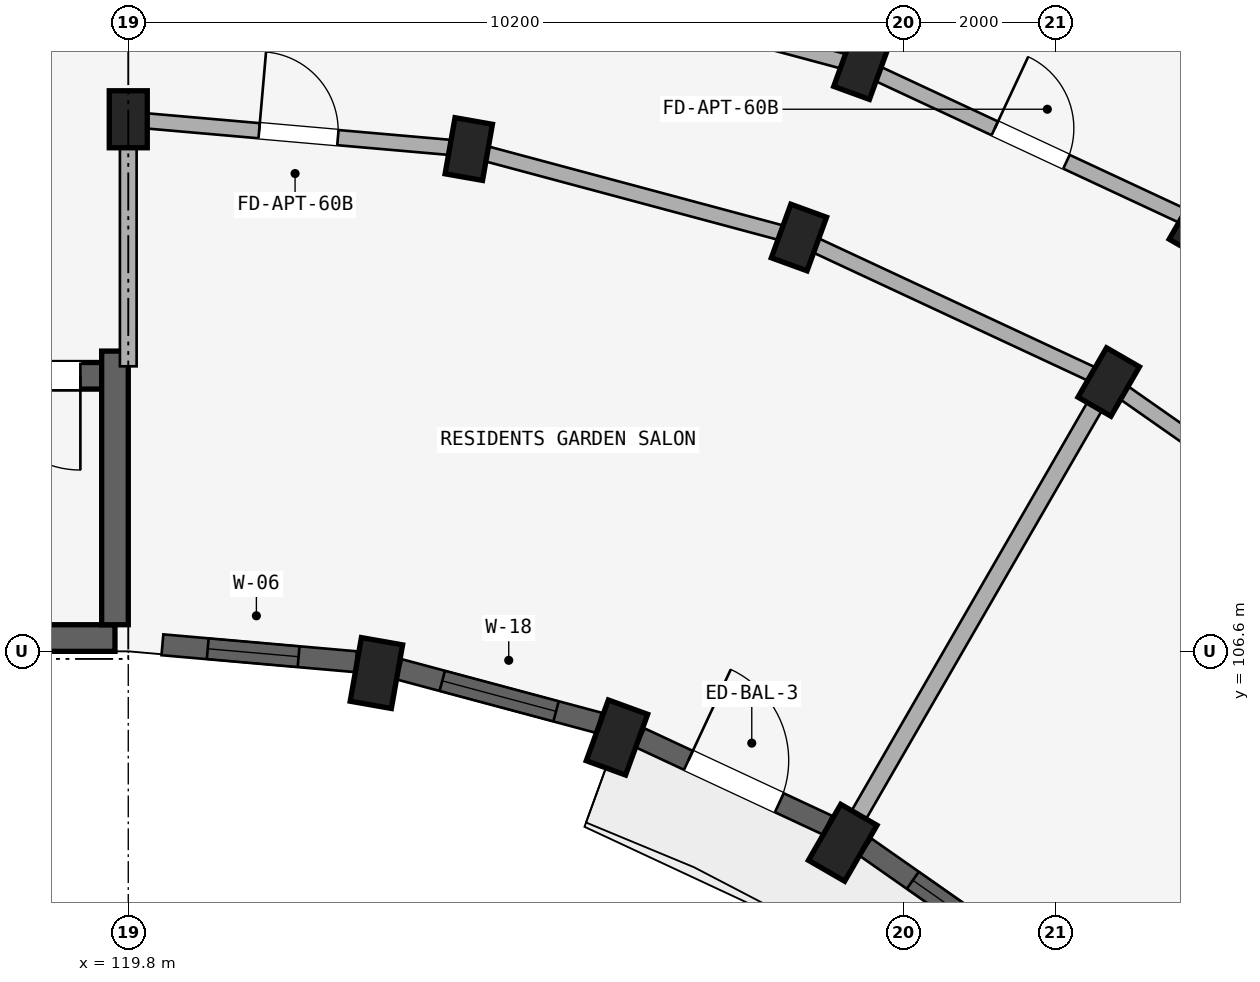
"""IFC4 building model, lengths in metres.
Left out: names, types, materials, properties, quantities, classifications, styles, units other than length and angle.
Written with IfcOpenShell. Run it as: python <this file> out.ifc"""

import sys

from ifc_helpers import new_model, si_unit, direction, frame, frame_2d, origin, origin_2d, place, context, subcontext, project, spatial, rectangle, extrude, element, fill, save


model = new_model("IFC4")
c1 = context("Model", 3, precision=1e-05, world=origin(), true_north=direction((0.0, 1.0)))
c2 = subcontext(c1, "Body", "Model", "MODEL_VIEW")
j1 = project(units=[si_unit("LENGTHUNIT", "METRE"), si_unit("PLANEANGLEUNIT", "RADIAN")], contexts=[c1])
p1 = place(None, origin())
s1 = spatial("IfcSite", under=j1, at=p1, CompositionType="ELEMENT")
p2 = place(p1, origin())
s2 = spatial("IfcBuilding", under=s1, at=p2, CompositionType="ELEMENT")
p3 = place(p2, frame((0.0, 0.0, 8.7)))
s3 = spatial("IfcBuildingStorey", under=s2, at=p3, CompositionType="ELEMENT", Elevation=8.7)
p4 = place(p3, frame((119.625, 106.775, 0.0), z_axis=(0.0, 0.0, 1.0), x_axis=(-1.0, 0.0, 0.0)))
e1 = element("IfcWall", 1, at=p4, inside=s3, PredefinedType="SHEAR", context=c2, shape_type="SweptSolid", body=[
    extrude(rectangle(XDim=8.25, YDim=0.35, at=frame_2d((4.125, 0.0))), origin(), (0.0, 0.0, 1.0), 2.93),
])
p5 = place(p3, frame((119.45, 110.225, 0.0), z_axis=(0.0, 0.0, 1.0), x_axis=(-1.0, 0.0, 0.0)))
e2 = element("IfcWall", 2, at=p5, inside=s3, PredefinedType="SHEAR", context=c2, shape_type="SweptSolid", body=[
    extrude(rectangle(XDim=7.9, YDim=0.35, at=frame_2d((3.95, 0.0))), origin(), (0.0, 0.0, 1.0), 2.93),
])
p6 = place(p5, frame((0.28, 0.0, 0.0)))
e3 = element("IfcOpeningElement", 3, at=p6, cuts=e2, PredefinedType="OPENING", context=c2, shape_type="SweptSolid", body=[
    extrude(rectangle(XDim=1.24, YDim=2.15, at=frame_2d((0.62, 1.075))), frame((0.0, 0.185, 0.0), z_axis=(0.0, -1.0, 0.0), x_axis=(1.0, 0.0, 0.0)), (0.0, 0.0, 1.0), 0.37),
])
p7 = place(p3, frame((119.625, 106.95, 0.0), z_axis=(0.0, 0.0, 1.0), x_axis=(0.0, 1.0, 0.0)))
e4 = element("IfcWall", 4, at=p7, inside=s3, PredefinedType="SHEAR", context=c2, shape_type="SweptSolid", body=[
    extrude(rectangle(XDim=3.6, YDim=0.35, at=frame_2d((1.8, 0.0))), origin(), (0.0, 0.0, 1.0), 2.93),
])
p8 = place(p3, frame((119.8, 113.6, 0.0), z_axis=(0.0, 0.0, 1.0), x_axis=(1.0, 0.0, 0.0)))
e5 = element("IfcColumn", 5, at=p8, inside=s3, PredefinedType="COLUMN", context=c2, shape_type="SweptSolid", body=[
    extrude(rectangle(XDim=0.5, YDim=0.75, at=origin_2d()), origin(), (0.0, 0.0, 1.0), 2.93),
])
p9 = place(p3, frame((123.065, 106.314, 0.0), z_axis=(0.0, 0.0, 1.0), x_axis=(-0.984807753012, 0.173648177667, 0.0)))
e6 = element("IfcColumn", 6, at=p9, inside=s3, PredefinedType="COLUMN", context=c2, shape_type="SweptSolid", body=[
    extrude(rectangle(XDim=0.55, YDim=0.85, at=origin_2d()), origin(), (0.0, 0.0, 1.0), 2.93),
])
p10 = place(p3, frame((124.28, 113.208, 0.0), z_axis=(0.0, 0.0, 1.0), x_axis=(-0.984807753012, 0.173648177667, 0.0)))
e7 = element("IfcColumn", 7, at=p10, inside=s3, PredefinedType="COLUMN", context=c2, shape_type="SweptSolid", body=[
    extrude(rectangle(XDim=0.5, YDim=0.75, at=origin_2d()), origin(), (0.0, 0.0, 1.0), 2.93),
])
p11 = place(p3, frame((126.23, 105.466, 0.0), z_axis=(0.0, 0.0, 1.0), x_axis=(-0.939692620786, 0.342020143326, 0.0)))
e8 = element("IfcColumn", 8, at=p11, inside=s3, PredefinedType="COLUMN", context=c2, shape_type="SweptSolid", body=[
    extrude(rectangle(XDim=0.55, YDim=0.85, at=origin_2d()), origin(), (0.0, 0.0, 1.0), 2.93),
])
for number, where, z_axis, x_axis in (
    (9, (128.624, 112.044, 0.0), (0.0, 0.0, 1.0), (-0.94, 0.342, 0.0)),
    (10, (129.445, 114.299, 0.0), (0.0, 0.0, 1.0), (-0.94, 0.342, 0.0)),
):
    element("IfcColumn", number, at=place(p3, frame(where, z_axis=z_axis, x_axis=x_axis)), inside=s3, PredefinedType="COLUMN", context=c2, shape_type="SweptSolid", body=[
        extrude(rectangle(XDim=0.5, YDim=0.75, at=origin_2d()), origin(), (0.0, 0.0, 1.0), 2.93),
    ])
p12 = place(p3, frame((129.2, 104.081, 0.0), z_axis=(0.0, 0.0, 1.0), x_axis=(-0.866025403784, 0.5, 0.0)))
e11 = element("IfcColumn", 11, at=p12, inside=s3, PredefinedType="COLUMN", context=c2, shape_type="SweptSolid", body=[
    extrude(rectangle(XDim=0.55, YDim=0.85, at=origin_2d()), origin(), (0.0, 0.0, 1.0), 2.93),
])
for number, where, z_axis, x_axis in (
    (12, (132.7, 110.144, 0.0), (0.0, 0.0, 1.0), (-0.866, 0.5, 0.0)),
    (13, (133.9, 112.222, 0.0), (0.0, 0.0, 1.0), (-0.866, 0.5, 0.0)),
):
    element("IfcColumn", number, at=place(p3, frame(where, z_axis=z_axis, x_axis=x_axis)), inside=s3, PredefinedType="COLUMN", context=c2, shape_type="SweptSolid", body=[
        extrude(rectangle(XDim=0.5, YDim=0.75, at=origin_2d()), origin(), (0.0, 0.0, 1.0), 2.93),
    ])
p13 = place(p3, frame((119.8, 113.6, 0.0), z_axis=(0.0, 0.0, 1.0), x_axis=(0.996191949488, -0.087187153726, 0.0)))
e14 = element("IfcWall", 14, at=p13, inside=s3, PredefinedType="STANDARD", context=c2, shape_type="SweptSolid", body=[
    extrude(rectangle(XDim=4.497, YDim=0.2, at=frame_2d((2.249, 0.0))), origin(), (0.0, 0.0, 1.0), 2.372),
])
p14 = place(p13, frame((1.729, 0.0, 0.0)))
e15 = element("IfcOpeningElement", 15, at=p14, cuts=e14, PredefinedType="OPENING", context=c2, shape_type="SweptSolid", body=[
    extrude(rectangle(XDim=1.04, YDim=2.15, at=frame_2d((0.52, 1.075))), frame((0.0, 0.11, 0.0), z_axis=(0.0, -1.0, 0.0), x_axis=(1.0, 0.0, 0.0)), (0.0, 0.0, 1.0), 0.22),
])
p15 = place(p3, frame((124.28, 113.208, 0.0), z_axis=(0.0, 0.0, 1.0), x_axis=(0.965934240054, -0.258787642463, 0.0)))
e16 = element("IfcWall", 16, at=p15, inside=s3, PredefinedType="STANDARD", context=c2, shape_type="SweptSolid", body=[
    extrude(rectangle(XDim=4.497, YDim=0.2, at=frame_2d((2.249, 0.0))), origin(), (0.0, 0.0, 1.0), 2.372),
])
p16 = place(p3, frame((124.697, 115.572, 0.0), z_axis=(0.0, 0.0, 1.0), x_axis=(0.965930095386, -0.258803112091, 0.0)))
e17 = element("IfcWall", 17, at=p16, inside=s3, PredefinedType="STANDARD", context=c2, shape_type="SweptSolid", body=[
    extrude(rectangle(XDim=4.916, YDim=0.2, at=frame_2d((2.458, 0.0))), origin(), (0.0, 0.0, 1.0), 2.372),
])
p17 = place(p3, frame((128.624, 112.044, 0.0), z_axis=(0.0, 0.0, 1.0), x_axis=(0.906307919131, -0.422617978463, 0.0)))
e18 = element("IfcWall", 18, at=p17, inside=s3, PredefinedType="STANDARD", context=c2, shape_type="SweptSolid", body=[
    extrude(rectangle(XDim=4.497, YDim=0.2, at=frame_2d((2.249, 0.0))), origin(), (0.0, 0.0, 1.0), 2.372),
])
p18 = place(p3, frame((129.445, 114.299, 0.0), z_axis=(0.0, 0.0, 1.0), x_axis=(0.906302381024, -0.422629854778, 0.0)))
e19 = element("IfcWall", 19, at=p18, inside=s3, PredefinedType="STANDARD", context=c2, shape_type="SweptSolid", body=[
    extrude(rectangle(XDim=4.915, YDim=0.2, at=frame_2d((2.458, 0.0))), origin(), (0.0, 0.0, 1.0), 2.372),
])
p19 = place(p18, frame((1.938, 0.0, 0.0)))
e20 = element("IfcOpeningElement", 20, at=p19, cuts=e19, PredefinedType="OPENING", context=c2, shape_type="SweptSolid", body=[
    extrude(rectangle(XDim=1.04, YDim=2.15, at=frame_2d((0.52, 1.075))), frame((0.0, 0.11, 0.0), z_axis=(0.0, -1.0, 0.0), x_axis=(1.0, 0.0, 0.0)), (0.0, 0.0, 1.0), 0.22),
])
p20 = place(p3, frame((132.7, 110.144, 0.0), z_axis=(0.0, 0.0, 1.0), x_axis=(0.819155404658, -0.573571637217, 0.0)))
e21 = element("IfcWall", 21, at=p20, inside=s3, PredefinedType="STANDARD", context=c2, shape_type="SweptSolid", body=[
    extrude(rectangle(XDim=4.497, YDim=0.2, at=frame_2d((2.249, 0.0))), origin(), (0.0, 0.0, 1.0), 2.372),
])
p21 = place(p20, frame((1.709, 0.0, 0.0)))
e22 = element("IfcOpeningElement", 22, at=p21, cuts=e21, PredefinedType="OPENING", context=c2, shape_type="SweptSolid", body=[
    extrude(rectangle(XDim=1.08, YDim=2.15, at=frame_2d((0.54, 1.075))), frame((0.0, 0.11, 0.0), z_axis=(0.0, -1.0, 0.0), x_axis=(1.0, 0.0, 0.0)), (0.0, 0.0, 1.0), 0.22),
])
p22 = place(p3, frame((119.8, 110.35, 0.0), z_axis=(0.0, 0.0, 1.0), x_axis=(0.0, 1.0, 0.0)))
e23 = element("IfcWall", 23, at=p22, inside=s3, PredefinedType="STANDARD", context=c2, shape_type="SweptSolid", body=[
    extrude(rectangle(XDim=3.2, YDim=0.22, at=frame_2d((1.6, 0.0))), origin(), (0.0, 0.0, 1.0), 2.372),
])
p23 = place(p3, frame((129.479, 114.393, 0.0), z_axis=(0.0, 0.0, 1.0), x_axis=(0.342022120477, 0.939691901159, 0.0)))
e24 = element("IfcWall", 24, at=p23, inside=s3, PredefinedType="STANDARD", context=c2, shape_type="SweptSolid", body=[
    extrude(rectangle(XDim=17.42, YDim=0.23, at=frame_2d((8.71, 0.0))), origin(), (0.0, 0.0, 1.0), 2.372),
])
p24 = place(p3, frame((129.3, 104.254, 0.0), z_axis=(0.0, 0.0, 1.0), x_axis=(0.499997969693, 0.866026575979, 0.0)))
e25 = element("IfcWall", 25, at=p24, inside=s3, PredefinedType="STANDARD", context=c2, shape_type="SweptSolid", body=[
    extrude(rectangle(XDim=6.75, YDim=0.22, at=frame_2d((3.375, 0.0))), origin(), (0.0, 0.0, 1.0), 2.372),
])
p25 = place(p3, frame((120.249, 106.686, 0.0), z_axis=(0.0, 0.0, 1.0), x_axis=(0.996194235595, -0.08716102895, 0.0)))
e26 = element("IfcWall", 26, at=p25, inside=s3, PredefinedType="STANDARD", context=c2, shape_type="SweptSolid", body=[
    extrude(rectangle(XDim=2.557, YDim=0.275, at=frame_2d((1.279, 0.0))), origin(), (0.0, 0.0, 1.0), 2.472),
])
p26 = place(p25, frame((0.599, 0.0, 0.772)))
e27 = element("IfcOpeningElement", 27, at=p26, cuts=e26, PredefinedType="OPENING", context=c2, shape_type="SweptSolid", body=[
    extrude(rectangle(XDim=1.2, YDim=1.5, at=frame_2d((0.6, 0.75))), frame((0.0, 0.147, 0.0), z_axis=(0.0, -1.0, 0.0), x_axis=(1.0, 0.0, 0.0)), (0.0, 0.0, 1.0), 0.295),
])
p27 = place(p3, frame((123.367, 106.363, 0.0), z_axis=(0.0, 0.0, 1.0), x_axis=(0.965925595341, -0.258819907011, 0.0)))
e28 = element("IfcWall", 28, at=p27, inside=s3, PredefinedType="STANDARD", context=c2, shape_type="SweptSolid", body=[
    extrude(rectangle(XDim=2.718, YDim=0.275, at=frame_2d((1.359, 0.0))), origin(), (0.0, 0.0, 1.0), 2.472),
])
p28 = place(p27, frame((0.584, 0.0, 0.672)))
e29 = element("IfcOpeningElement", 29, at=p28, cuts=e28, PredefinedType="OPENING", context=c2, shape_type="SweptSolid", body=[
    extrude(rectangle(XDim=1.55, YDim=1.6, at=frame_2d((0.775, 0.8))), frame((0.0, 0.147, 0.0), z_axis=(0.0, -1.0, 0.0), x_axis=(1.0, 0.0, 0.0)), (0.0, 0.0, 1.0), 0.295),
])
p29 = place(p3, frame((126.536, 105.461, 0.0), z_axis=(0.0, 0.0, 1.0), x_axis=(0.906311629168, -0.422610022166, 0.0)))
e30 = element("IfcWall", 30, at=p29, inside=s3, PredefinedType="STANDARD", context=c2, shape_type="SweptSolid", body=[
    extrude(rectangle(XDim=2.718, YDim=0.275, at=frame_2d((1.359, 0.0))), origin(), (0.0, 0.0, 1.0), 2.472),
])
p30 = place(p29, frame((0.699, 0.0, 0.0)))
e31 = element("IfcOpeningElement", 31, at=p30, cuts=e30, PredefinedType="OPENING", context=c2, shape_type="SweptSolid", body=[
    extrude(rectangle(XDim=1.32, YDim=2.15, at=frame_2d((0.66, 1.075))), frame((0.0, 0.147, 0.0), z_axis=(0.0, -1.0, 0.0), x_axis=(1.0, 0.0, 0.0)), (0.0, 0.0, 1.0), 0.295),
])
p31 = place(p3, frame((129.501, 104.023, 0.0), z_axis=(0.0, 0.0, 1.0), x_axis=(0.81917282593, -0.573546755948, 0.0)))
e32 = element("IfcWall", 32, at=p31, inside=s3, PredefinedType="STANDARD", context=c2, shape_type="SweptSolid", body=[
    extrude(rectangle(XDim=2.718, YDim=0.275, at=frame_2d((1.359, 0.0))), origin(), (0.0, 0.0, 1.0), 2.472),
])
p32 = place(p31, frame((0.759, 0.0, 0.772)))
e33 = element("IfcOpeningElement", 33, at=p32, cuts=e32, PredefinedType="OPENING", context=c2, shape_type="SweptSolid", body=[
    extrude(rectangle(XDim=1.2, YDim=1.5, at=frame_2d((0.6, 0.75))), frame((0.0, 0.147, 0.0), z_axis=(0.0, -1.0, 0.0), x_axis=(1.0, 0.0, 0.0)), (0.0, 0.0, 1.0), 0.295),
])
p33 = place(p26, origin())
e34 = element("IfcWindow", 34, at=p33, inside=s3, PartitioningType="SINGLE_PANEL", PredefinedType="WINDOW", context=c2, shape_type="SweptSolid", body=[
    extrude(rectangle(XDim=1.2, YDim=1.5, at=frame_2d((0.6, 0.75))), frame((0.0, 0.03, 0.0), z_axis=(0.0, -1.0, 0.0), x_axis=(1.0, 0.0, 0.0)), (0.0, 0.0, 1.0), 0.06),
])
fill(e27, e34)
p34 = place(p28, origin())
e35 = element("IfcWindow", 35, at=p34, inside=s3, PartitioningType="DOUBLE_PANEL_VERTICAL", PredefinedType="WINDOW", context=c2, shape_type="SweptSolid", body=[
    extrude(rectangle(XDim=1.55, YDim=1.6, at=frame_2d((0.775, 0.8))), frame((0.0, 0.03, 0.0), z_axis=(0.0, -1.0, 0.0), x_axis=(1.0, 0.0, 0.0)), (0.0, 0.0, 1.0), 0.06),
])
fill(e29, e35)
p35 = place(p32, origin())
e36 = element("IfcWindow", 36, at=p35, inside=s3, PartitioningType="SINGLE_PANEL", PredefinedType="WINDOW", context=c2, shape_type="SweptSolid", body=[
    extrude(rectangle(XDim=1.2, YDim=1.5, at=frame_2d((0.6, 0.75))), frame((0.0, 0.03, 0.0), z_axis=(0.0, -1.0, 0.0), x_axis=(1.0, 0.0, 0.0)), (0.0, 0.0, 1.0), 0.06),
])
fill(e33, e36)
p36 = place(p6, origin())
e37 = element("IfcDoor", 37, at=p36, inside=s3, OperationType="SINGLE_SWING_LEFT", PredefinedType="DOOR", context=c2, shape_type="SweptSolid", body=[
    extrude(rectangle(XDim=1.24, YDim=2.15, at=frame_2d((0.62, 1.075))), frame((0.0, 0.025, 0.0), z_axis=(0.0, -1.0, 0.0), x_axis=(1.0, 0.0, 0.0)), (0.0, 0.0, 1.0), 0.05),
])
fill(e3, e37)
p37 = place(p19, frame((1.04, 0.0, 0.0), z_axis=(0.0, 0.0, 1.0), x_axis=(-1.0, 0.0, 0.0)))
e38 = element("IfcDoor", 38, at=p37, inside=s3, OperationType="SINGLE_SWING_RIGHT", PredefinedType="DOOR", context=c2, shape_type="SweptSolid", body=[
    extrude(rectangle(XDim=1.04, YDim=2.15, at=frame_2d((0.52, 1.075))), frame((0.0, 0.025, 0.0), z_axis=(0.0, -1.0, 0.0), x_axis=(1.0, 0.0, 0.0)), (0.0, 0.0, 1.0), 0.05),
])
fill(e20, e38)
p38 = place(p14, origin())
e39 = element("IfcDoor", 39, at=p38, inside=s3, OperationType="SINGLE_SWING_LEFT", PredefinedType="DOOR", context=c2, shape_type="SweptSolid", body=[
    extrude(rectangle(XDim=1.04, YDim=2.15, at=frame_2d((0.52, 1.075))), frame((0.0, 0.025, 0.0), z_axis=(0.0, -1.0, 0.0), x_axis=(1.0, 0.0, 0.0)), (0.0, 0.0, 1.0), 0.05),
])
fill(e15, e39)
p39 = place(p30, frame((1.32, 0.0, 0.0), z_axis=(0.0, 0.0, 1.0), x_axis=(-1.0, 0.0, 0.0)))
e40 = element("IfcDoor", 40, at=p39, inside=s3, OperationType="SINGLE_SWING_RIGHT", PredefinedType="DOOR", context=c2, shape_type="SweptSolid", body=[
    extrude(rectangle(XDim=1.32, YDim=2.15, at=frame_2d((0.66, 1.075))), frame((0.0, 0.025, 0.0), z_axis=(0.0, -1.0, 0.0), x_axis=(1.0, 0.0, 0.0)), (0.0, 0.0, 1.0), 0.05),
])
fill(e31, e40)
save(model, sys.argv[1])
